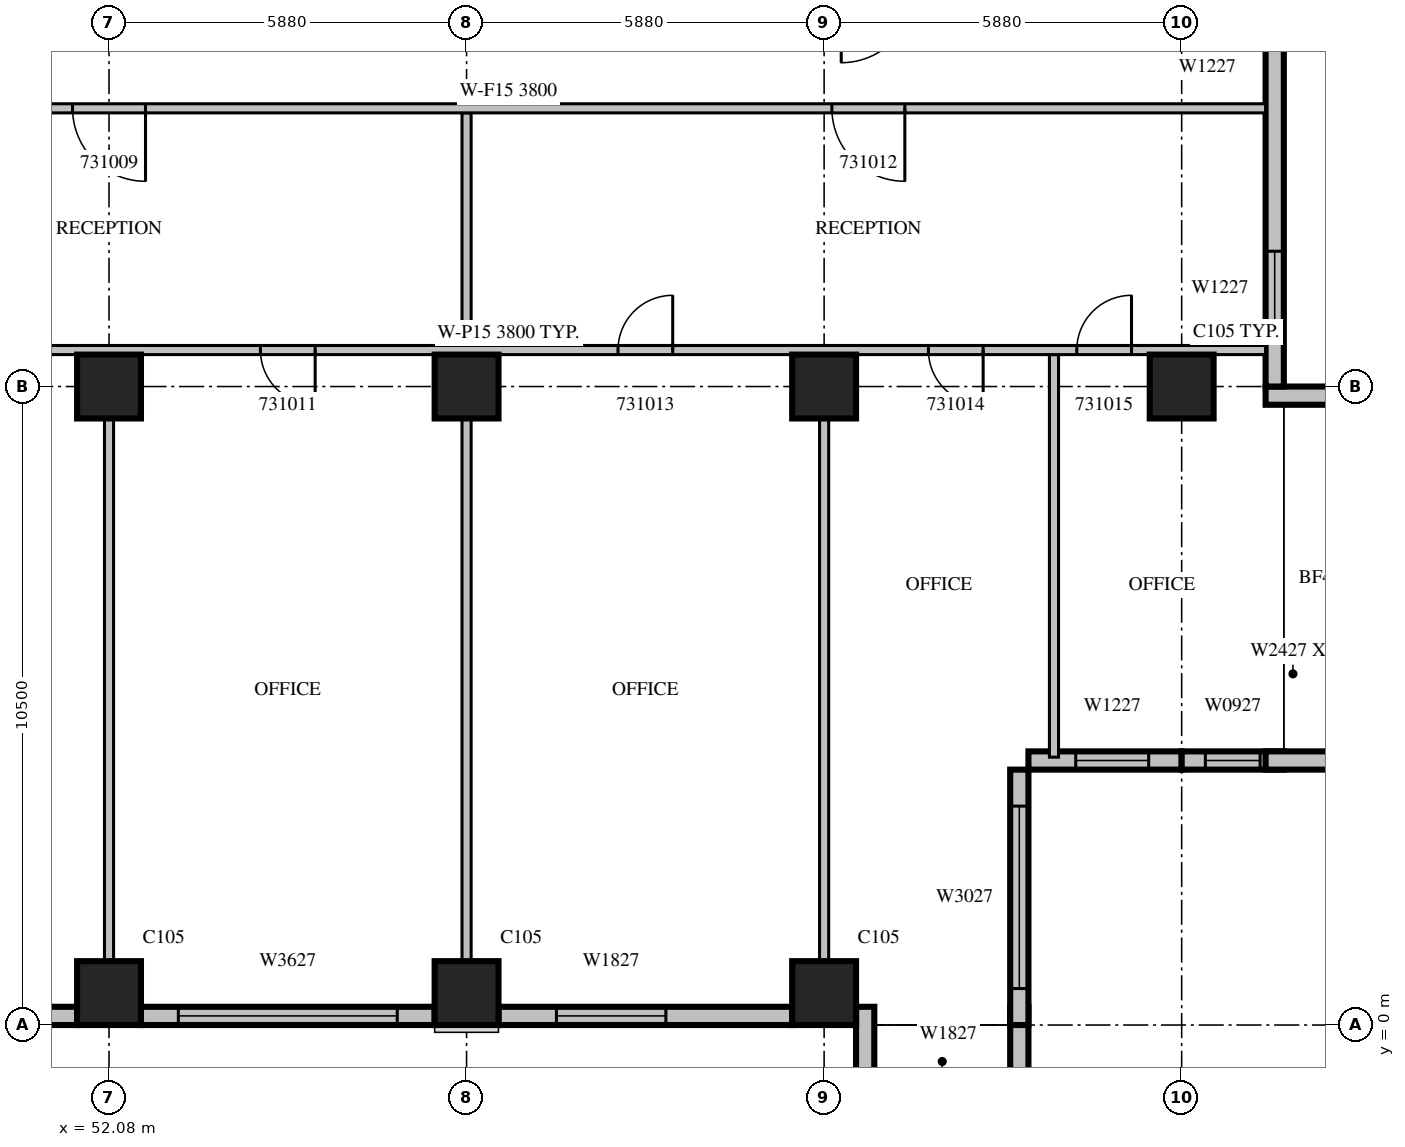
"""IFC4 building model, lengths in metres.
Left out: names, types, materials, properties, quantities, classifications, styles, units other than length and angle.
Written with IfcOpenShell. Run it as: python <this file> out.ifc"""

import sys

from ifc_helpers import new_model, si_unit, direction, frame, frame_2d, origin, origin_2d, place, context, subcontext, project, spatial, rectangle, extrude, source, transform, mapped, element, fill, save


model = new_model("IFC4")
c1 = context("Model", 3, precision=1e-05, world=origin(), true_north=direction((0.0, 1.0)))
c2 = subcontext(c1, "Body", "Model", "MODEL_VIEW")
j1 = project(units=[si_unit("LENGTHUNIT", "METRE"), si_unit("PLANEANGLEUNIT", "RADIAN")], contexts=[c1])
p1 = place(None, origin())
s1 = spatial("IfcSite", under=j1, at=p1, CompositionType="ELEMENT")
p2 = place(p1, origin())
s2 = spatial("IfcBuilding", under=s1, at=p2, CompositionType="ELEMENT")
p3 = place(p2, frame((0.0, 0.0, 141.3)))
s3 = spatial("IfcBuildingStorey", under=s2, at=p3, CompositionType="ELEMENT", Elevation=141.3)
m1 = source(origin(), c2, "Body", "SweptSolid", [
    extrude(rectangle(XDim=1.05, YDim=1.05, at=origin_2d()), origin(), (0.0, 0.0, 1.0), 4.2),
])
for number, where, z_axis, x_axis in (
    (1, (52.08, 0.525, 0.0), (0.0, 0.0, 1.0), (1.0, 0.0, 0.0)),
    (2, (57.96, 0.525, 0.0), (0.0, 0.0, 1.0), (1.0, 0.0, 0.0)),
    (3, (63.84, 0.525, 0.0), (0.0, 0.0, 1.0), (1.0, 0.0, 0.0)),
    (4, (52.08, 10.5, 0.0), (0.0, 0.0, 1.0), (1.0, 0.0, 0.0)),
    (5, (57.96, 10.5, 0.0), (0.0, 0.0, 1.0), (1.0, 0.0, 0.0)),
    (6, (63.84, 10.5, 0.0), (0.0, 0.0, 1.0), (1.0, 0.0, 0.0)),
    (7, (69.72, 10.5, 0.0), (0.0, 0.0, 1.0), (1.0, 0.0, 0.0)),
):
    element("IfcColumn", number, at=place(p3, frame(where, z_axis=z_axis, x_axis=x_axis)), inside=s3, PredefinedType="COLUMN", context=c2, shape_type="MappedRepresentation", body=[
        mapped(m1, transform((0.0, 0.0, 0.0), scale=1.0)),
    ])
m2 = source(origin(), c2, "Body", "SweptSolid", [
    extrude(rectangle(XDim=4.83, YDim=0.3, at=frame_2d((2.415, 0.0))), origin(), (0.0, 0.0, 1.0), 3.3),
])
p4 = place(p3, frame((46.725, 0.15, 0.0), z_axis=(0.0, 0.0, 1.0), x_axis=(1.0, 0.0, 0.0)))
e8 = element("IfcWall", 8, at=p4, inside=s3, PredefinedType="STANDARD", context=c2, shape_type="MappedRepresentation", body=[
    mapped(m2, transform((0.0, 0.0, 0.0), scale=1.0)),
])
m3 = source(origin(), c2, "Body", "SweptSolid", [
    extrude(rectangle(XDim=3.6, YDim=2.7, at=frame_2d((1.8, 1.35))), frame((0.0, 0.16, 0.0), z_axis=(0.0, -1.0, 0.0), x_axis=(1.0, 0.0, 0.0)), (0.0, 0.0, 1.0), 0.32),
])
p5 = place(p4, frame((0.615, 0.0, 0.6)))
e9 = element("IfcOpeningElement", 9, at=p5, cuts=e8, PredefinedType="OPENING", context=c2, shape_type="MappedRepresentation", body=[
    mapped(m3, transform((0.0, 0.0, 0.0), scale=1.0)),
])
m4 = source(origin(), c2, "Body", "SweptSolid", [
    extrude(rectangle(XDim=4.83, YDim=0.3, at=frame_2d((2.415, 0.0))), origin(), (0.0, 0.0, 1.0), 3.8),
])
p6 = place(p3, frame((52.605, 0.15, 0.0), z_axis=(0.0, 0.0, 1.0), x_axis=(1.0, 0.0, 0.0)))
e10 = element("IfcWall", 10, at=p6, inside=s3, PredefinedType="STANDARD", context=c2, shape_type="MappedRepresentation", body=[
    mapped(m4, transform((0.0, 0.0, 0.0), scale=1.0)),
])
p7 = place(p6, frame((0.615, 0.0, 0.6)))
e11 = element("IfcOpeningElement", 11, at=p7, cuts=e10, PredefinedType="OPENING", context=c2, shape_type="MappedRepresentation", body=[
    mapped(m3, transform((0.0, 0.0, 0.0), scale=1.0)),
])
p8 = place(p3, frame((58.485, 0.15, 0.0), z_axis=(0.0, 0.0, 1.0), x_axis=(1.0, 0.0, 0.0)))
e12 = element("IfcWall", 12, at=p8, inside=s3, PredefinedType="STANDARD", context=c2, shape_type="MappedRepresentation", body=[
    mapped(m4, transform((0.0, 0.0, 0.0), scale=1.0)),
])
m5 = source(origin(), c2, "Body", "SweptSolid", [
    extrude(rectangle(XDim=1.8, YDim=2.7, at=frame_2d((0.9, 1.35))), frame((0.0, 0.16, 0.0), z_axis=(0.0, -1.0, 0.0), x_axis=(1.0, 0.0, 0.0)), (0.0, 0.0, 1.0), 0.32),
])
p9 = place(p8, frame((0.953, 0.0, 0.6)))
e13 = element("IfcOpeningElement", 13, at=p9, cuts=e12, PredefinedType="OPENING", context=c2, shape_type="MappedRepresentation", body=[
    mapped(m5, transform((0.0, 0.0, 0.0), scale=1.0)),
])
m6 = source(origin(), c2, "Body", "SweptSolid", [
    extrude(rectangle(XDim=1.2, YDim=0.3, at=frame_2d((0.6, 0.0))), origin(), (0.0, 0.0, 1.0), 3.8),
])
for number, where, z_axis, x_axis in (
    (14, (64.515, 0.3, 0.0), (0.0, 0.0, 1.0), (0.0, -1.0, 0.0)),
    (15, (67.05, 0.3, 0.0), (0.0, 0.0, 1.0), (0.0, -1.0, 0.0)),
):
    element("IfcWall", number, at=place(p3, frame(where, z_axis=z_axis, x_axis=x_axis)), inside=s3, PredefinedType="STANDARD", context=c2, shape_type="MappedRepresentation", body=[
        mapped(m6, transform((0.0, 0.0, 0.0), scale=1.0)),
    ])
m7 = source(origin(), c2, "Body", "SweptSolid", [
    extrude(rectangle(XDim=4.2, YDim=0.3, at=frame_2d((2.1, 0.0))), origin(), (0.0, 0.0, 1.0), 3.8),
])
p10 = place(p3, frame((67.05, 0.0, 0.0), z_axis=(0.0, 0.0, 1.0), x_axis=(0.0, 1.0, 0.0)))
e16 = element("IfcWall", 16, at=p10, inside=s3, PredefinedType="STANDARD", context=c2, shape_type="MappedRepresentation", body=[
    mapped(m7, transform((0.0, 0.0, 0.0), scale=1.0)),
])
m8 = source(origin(), c2, "Body", "SweptSolid", [
    extrude(rectangle(XDim=3.0, YDim=2.7, at=frame_2d((1.5, 1.35))), frame((0.0, 0.16, 0.0), z_axis=(0.0, -1.0, 0.0), x_axis=(1.0, 0.0, 0.0)), (0.0, 0.0, 1.0), 0.32),
])
p11 = place(p10, frame((0.6, 0.0, 0.6)))
e17 = element("IfcOpeningElement", 17, at=p11, cuts=e16, PredefinedType="OPENING", context=c2, shape_type="MappedRepresentation", body=[
    mapped(m8, transform((0.0, 0.0, 0.0), scale=1.0)),
])
m9 = source(origin(), c2, "Body", "SweptSolid", [
    extrude(rectangle(XDim=2.52, YDim=0.3, at=frame_2d((1.26, 0.0))), origin(), (0.0, 0.0, 1.0), 3.8),
])
p12 = place(p3, frame((67.2, 4.35, 0.0), z_axis=(0.0, 0.0, 1.0), x_axis=(1.0, 0.0, 0.0)))
e18 = element("IfcWall", 18, at=p12, inside=s3, PredefinedType="STANDARD", context=c2, shape_type="MappedRepresentation", body=[
    mapped(m9, transform((0.0, 0.0, 0.0), scale=1.0)),
])
m10 = source(origin(), c2, "Body", "SweptSolid", [
    extrude(rectangle(XDim=1.2, YDim=2.7, at=frame_2d((0.6, 1.35))), frame((0.0, 0.16, 0.0), z_axis=(0.0, -1.0, 0.0), x_axis=(1.0, 0.0, 0.0)), (0.0, 0.0, 1.0), 0.32),
])
p13 = place(p12, frame((0.777, 0.0, 0.6)))
e19 = element("IfcOpeningElement", 19, at=p13, cuts=e18, PredefinedType="OPENING", context=c2, shape_type="MappedRepresentation", body=[
    mapped(m10, transform((0.0, 0.0, 0.0), scale=1.0)),
])
m11 = source(origin(), c2, "Body", "SweptSolid", [
    extrude(rectangle(XDim=1.68, YDim=0.3, at=frame_2d((0.84, 0.0))), origin(), (0.0, 0.0, 1.0), 3.8),
])
p14 = place(p3, frame((69.72, 4.35, 0.0), z_axis=(0.0, 0.0, 1.0), x_axis=(1.0, 0.0, 0.0)))
e20 = element("IfcWall", 20, at=p14, inside=s3, PredefinedType="STANDARD", context=c2, shape_type="MappedRepresentation", body=[
    mapped(m11, transform((0.0, 0.0, 0.0), scale=1.0)),
])
m12 = source(origin(), c2, "Body", "SweptSolid", [
    extrude(rectangle(XDim=0.9, YDim=2.7, at=frame_2d((0.45, 1.35))), frame((0.0, 0.16, 0.0), z_axis=(0.0, -1.0, 0.0), x_axis=(1.0, 0.0, 0.0)), (0.0, 0.0, 1.0), 0.32),
])
p15 = place(p14, frame((0.39, 0.0, 0.6)))
e21 = element("IfcOpeningElement", 21, at=p15, cuts=e20, PredefinedType="OPENING", context=c2, shape_type="MappedRepresentation", body=[
    mapped(m12, transform((0.0, 0.0, 0.0), scale=1.0)),
])
for number, where, z_axis, x_axis in (
    (22, (71.1, 4.35, 0.0), (0.0, 0.0, 1.0), (1.0, 0.0, 0.0)),
    (23, (71.1, 10.35, 0.0), (0.0, 0.0, 1.0), (1.0, 0.0, 0.0)),
):
    element("IfcWall", number, at=place(p3, frame(where, z_axis=z_axis, x_axis=x_axis)), inside=s3, PredefinedType="STANDARD", context=c2, shape_type="MappedRepresentation", body=[
        mapped(m6, transform((0.0, 0.0, 0.0), scale=1.0)),
    ])
m13 = source(origin(), c2, "Body", "SweptSolid", [
    extrude(rectangle(XDim=6.3, YDim=0.3, at=frame_2d((3.15, 0.0))), origin(), (0.0, 0.0, 1.0), 3.8),
])
p16 = place(p3, frame((71.25, 10.5, 0.0), z_axis=(0.0, 0.0, 1.0), x_axis=(0.0, 1.0, 0.0)))
e24 = element("IfcWall", 24, at=p16, inside=s3, PredefinedType="STANDARD", context=c2, shape_type="MappedRepresentation", body=[
    mapped(m13, transform((0.0, 0.0, 0.0), scale=1.0)),
])
p17 = place(p16, frame((1.025, 0.0, 0.6)))
e25 = element("IfcOpeningElement", 25, at=p17, cuts=e24, PredefinedType="OPENING", context=c2, shape_type="MappedRepresentation", body=[
    mapped(m10, transform((0.0, 0.0, 0.0), scale=1.0)),
])
m14 = source(origin(), c2, "Body", "SweptSolid", [
    extrude(rectangle(XDim=8.927, YDim=0.15, at=frame_2d((4.463, 0.0))), origin(), (0.0, 0.0, 1.0), 3.8),
])
for number, where, z_axis, x_axis in (
    (26, (52.08, 1.049, 0.0), (0.0, 0.0, 1.0), (0.0, 1.0, 0.0)),
    (27, (63.84, 1.049, 0.0), (0.0, 0.0, 1.0), (0.0, 1.0, 0.0)),
):
    element("IfcWall", number, at=place(p3, frame(where, z_axis=z_axis, x_axis=x_axis)), inside=s3, PredefinedType="PARTITIONING", context=c2, shape_type="MappedRepresentation", body=[
        mapped(m14, transform((0.0, 0.0, 0.0), scale=1.0)),
    ])
m15 = source(origin(), c2, "Body", "SweptSolid", [
    extrude(rectangle(XDim=6.62, YDim=0.15, at=frame_2d((3.31, 0.0))), origin(), (0.0, 0.0, 1.0), 3.8),
])
p18 = place(p3, frame((67.62, 4.405, 0.0), z_axis=(0.0, 0.0, 1.0), x_axis=(0.0, 1.0, 0.0)))
e28 = element("IfcWall", 28, at=p18, inside=s3, PredefinedType="PARTITIONING", context=c2, shape_type="MappedRepresentation", body=[
    mapped(m15, transform((0.0, 0.0, 0.0), scale=1.0)),
])
p19 = place(p3, frame((57.96, 1.049, 0.0), z_axis=(0.0, 0.0, 1.0), x_axis=(0.0, 1.0, 0.0)))
e29 = element("IfcWall", 29, at=p19, inside=s3, PredefinedType="PARTITIONING", context=c2, shape_type="MappedRepresentation", body=[
    mapped(m14, transform((0.0, 0.0, 0.0), scale=1.0)),
])
m16 = source(origin(), c2, "Body", "SweptSolid", [
    extrude(rectangle(XDim=3.825, YDim=0.15, at=frame_2d((1.913, 0.0))), origin(), (0.0, 0.0, 1.0), 3.8),
])
p20 = place(p3, frame((57.96, 11.175, 0.0), z_axis=(0.0, 0.0, 1.0), x_axis=(0.0, 1.0, 0.0)))
e30 = element("IfcWall", 30, at=p20, inside=s3, PredefinedType="PARTITIONING", context=c2, shape_type="MappedRepresentation", body=[
    mapped(m16, transform((0.0, 0.0, 0.0), scale=1.0)),
])
m17 = source(origin(), c2, "Body", "SweptSolid", [
    extrude(rectangle(XDim=24.9, YDim=0.15, at=frame_2d((12.45, 0.0))), origin(), (0.0, 0.0, 1.0), 3.8),
])
p21 = place(p3, frame((71.1, 11.1, 0.0), z_axis=(0.0, 0.0, 1.0), x_axis=(-1.0, 0.0, 0.0)))
e31 = element("IfcWall", 31, at=p21, inside=s3, PredefinedType="PARTITIONING", context=c2, shape_type="MappedRepresentation", body=[
    mapped(m17, transform((0.0, 0.0, 0.0), scale=1.0)),
])
m18 = source(origin(), c2, "Body", "SweptSolid", [
    extrude(rectangle(XDim=0.9, YDim=2.1, at=frame_2d((0.45, 1.05))), frame((0.0, 0.085, 0.0), z_axis=(0.0, -1.0, 0.0), x_axis=(1.0, 0.0, 0.0)), (0.0, 0.0, 1.0), 0.17),
])
p22 = place(p21, frame((21.51, 0.0, 0.0)))
e32 = element("IfcOpeningElement", 32, at=p22, cuts=e31, PredefinedType="OPENING", context=c2, shape_type="MappedRepresentation", body=[
    mapped(m18, transform((0.0, 0.0, 0.0), scale=1.0)),
])
p23 = place(p21, frame((15.63, 0.0, 0.0)))
e33 = element("IfcOpeningElement", 33, at=p23, cuts=e31, PredefinedType="OPENING", context=c2, shape_type="MappedRepresentation", body=[
    mapped(m18, transform((0.0, 0.0, 0.0), scale=1.0)),
])
p24 = place(p21, frame((9.75, 0.0, 0.0)))
e34 = element("IfcOpeningElement", 34, at=p24, cuts=e31, PredefinedType="OPENING", context=c2, shape_type="MappedRepresentation", body=[
    mapped(m18, transform((0.0, 0.0, 0.0), scale=1.0)),
])
p25 = place(p21, frame((4.645, 0.0, 0.0)))
e35 = element("IfcOpeningElement", 35, at=p25, cuts=e31, PredefinedType="OPENING", context=c2, shape_type="MappedRepresentation", body=[
    mapped(m18, transform((0.0, 0.0, 0.0), scale=1.0)),
])
p26 = place(p21, frame((2.205, 0.0, 0.0)))
e36 = element("IfcOpeningElement", 36, at=p26, cuts=e31, PredefinedType="OPENING", context=c2, shape_type="MappedRepresentation", body=[
    mapped(m18, transform((0.0, 0.0, 0.0), scale=1.0)),
])
p27 = place(p3, frame((71.1, 15.075, 0.0), z_axis=(0.0, 0.0, 1.0), x_axis=(-1.0, 0.0, 0.0)))
e37 = element("IfcWall", 37, at=p27, inside=s3, PredefinedType="PARTITIONING", context=c2, shape_type="MappedRepresentation", body=[
    mapped(m17, transform((0.0, 0.0, 0.0), scale=1.0)),
])
m19 = source(origin(), c2, "Body", "SweptSolid", [
    extrude(rectangle(XDim=1.2, YDim=2.1, at=frame_2d((0.6, 1.05))), frame((0.0, 0.085, 0.0), z_axis=(0.0, -1.0, 0.0), x_axis=(1.0, 0.0, 0.0)), (0.0, 0.0, 1.0), 0.17),
])
p28 = place(p27, frame((18.42, 0.0, 0.0)))
e38 = element("IfcOpeningElement", 38, at=p28, cuts=e37, PredefinedType="OPENING", context=c2, shape_type="MappedRepresentation", body=[
    mapped(m19, transform((0.0, 0.0, 0.0), scale=1.0)),
])
p29 = place(p27, frame((5.933, 0.0, 0.0)))
e39 = element("IfcOpeningElement", 39, at=p29, cuts=e37, PredefinedType="OPENING", context=c2, shape_type="MappedRepresentation", body=[
    mapped(m19, transform((0.0, 0.0, 0.0), scale=1.0)),
])
m20 = source(origin(), c2, "Body", "SweptSolid", [
    extrude(rectangle(XDim=3.6, YDim=2.7, at=frame_2d((1.8, 1.35))), frame((0.0, 0.03, 0.0), z_axis=(0.0, -1.0, 0.0), x_axis=(1.0, 0.0, 0.0)), (0.0, 0.0, 1.0), 0.06),
])
p30 = place(p7, origin())
e40 = element("IfcWindow", 40, at=p30, inside=s3, PartitioningType="SINGLE_PANEL", PredefinedType="WINDOW", context=c2, shape_type="MappedRepresentation", body=[
    mapped(m20, transform((0.0, 0.0, 0.0), scale=1.0)),
])
fill(e11, e40)
m21 = source(origin(), c2, "Body", "SweptSolid", [
    extrude(rectangle(XDim=1.8, YDim=2.7, at=frame_2d((0.9, 1.35))), frame((0.0, 0.03, 0.0), z_axis=(0.0, -1.0, 0.0), x_axis=(1.0, 0.0, 0.0)), (0.0, 0.0, 1.0), 0.06),
])
p31 = place(p9, origin())
e41 = element("IfcWindow", 41, at=p31, inside=s3, PartitioningType="SINGLE_PANEL", PredefinedType="WINDOW", context=c2, shape_type="MappedRepresentation", body=[
    mapped(m21, transform((0.0, 0.0, 0.0), scale=1.0)),
])
fill(e13, e41)
m22 = source(origin(), c2, "Body", "SweptSolid", [
    extrude(rectangle(XDim=3.0, YDim=2.7, at=frame_2d((1.5, 1.35))), frame((0.0, 0.03, 0.0), z_axis=(0.0, -1.0, 0.0), x_axis=(1.0, 0.0, 0.0)), (0.0, 0.0, 1.0), 0.06),
])
p32 = place(p11, origin())
e42 = element("IfcWindow", 42, at=p32, inside=s3, PartitioningType="SINGLE_PANEL", PredefinedType="WINDOW", context=c2, shape_type="MappedRepresentation", body=[
    mapped(m22, transform((0.0, 0.0, 0.0), scale=1.0)),
])
fill(e17, e42)
m23 = source(origin(), c2, "Body", "SweptSolid", [
    extrude(rectangle(XDim=1.2, YDim=2.7, at=frame_2d((0.6, 1.35))), frame((0.0, 0.03, 0.0), z_axis=(0.0, -1.0, 0.0), x_axis=(1.0, 0.0, 0.0)), (0.0, 0.0, 1.0), 0.06),
])
p33 = place(p13, origin())
e43 = element("IfcWindow", 43, at=p33, inside=s3, PartitioningType="SINGLE_PANEL", PredefinedType="WINDOW", context=c2, shape_type="MappedRepresentation", body=[
    mapped(m23, transform((0.0, 0.0, 0.0), scale=1.0)),
])
fill(e19, e43)
m24 = source(origin(), c2, "Body", "SweptSolid", [
    extrude(rectangle(XDim=0.9, YDim=2.7, at=frame_2d((0.45, 1.35))), frame((0.0, 0.03, 0.0), z_axis=(0.0, -1.0, 0.0), x_axis=(1.0, 0.0, 0.0)), (0.0, 0.0, 1.0), 0.06),
])
p34 = place(p15, origin())
e44 = element("IfcWindow", 44, at=p34, inside=s3, PartitioningType="SINGLE_PANEL", PredefinedType="WINDOW", context=c2, shape_type="MappedRepresentation", body=[
    mapped(m24, transform((0.0, 0.0, 0.0), scale=1.0)),
])
fill(e21, e44)
p35 = place(p17, origin())
e45 = element("IfcWindow", 45, at=p35, inside=s3, PartitioningType="SINGLE_PANEL", PredefinedType="WINDOW", context=c2, shape_type="MappedRepresentation", body=[
    mapped(m23, transform((0.0, 0.0, 0.0), scale=1.0)),
])
fill(e25, e45)
m25 = source(origin(), c2, "Body", "SweptSolid", [
    extrude(rectangle(XDim=1.2, YDim=2.1, at=frame_2d((0.6, 1.05))), frame((0.0, 0.025, 0.0), z_axis=(0.0, -1.0, 0.0), x_axis=(1.0, 0.0, 0.0)), (0.0, 0.0, 1.0), 0.05),
])
p36 = place(p28, origin())
e46 = element("IfcDoor", 46, at=p36, inside=s3, OperationType="SINGLE_SWING_LEFT", PredefinedType="DOOR", context=c2, shape_type="MappedRepresentation", body=[
    mapped(m25, transform((0.0, 0.0, 0.0), scale=1.0)),
])
fill(e38, e46)
m26 = source(origin(), c2, "Body", "SweptSolid", [
    extrude(rectangle(XDim=0.9, YDim=2.1, at=frame_2d((0.45, 1.05))), frame((0.0, 0.025, 0.0), z_axis=(0.0, -1.0, 0.0), x_axis=(1.0, 0.0, 0.0)), (0.0, 0.0, 1.0), 0.05),
])
p37 = place(p23, origin())
e47 = element("IfcDoor", 47, at=p37, inside=s3, OperationType="SINGLE_SWING_LEFT", PredefinedType="DOOR", context=c2, shape_type="MappedRepresentation", body=[
    mapped(m26, transform((0.0, 0.0, 0.0), scale=1.0)),
])
fill(e33, e47)
p38 = place(p29, origin())
e48 = element("IfcDoor", 48, at=p38, inside=s3, OperationType="SINGLE_SWING_LEFT", PredefinedType="DOOR", context=c2, shape_type="MappedRepresentation", body=[
    mapped(m25, transform((0.0, 0.0, 0.0), scale=1.0)),
])
fill(e39, e48)
p39 = place(p24, origin())
e49 = element("IfcDoor", 49, at=p39, inside=s3, OperationType="SINGLE_SWING_RIGHT", PredefinedType="DOOR", context=c2, shape_type="MappedRepresentation", body=[
    mapped(m26, transform((0.0, 0.0, 0.0), scale=1.0)),
])
fill(e34, e49)
p40 = place(p25, origin())
e50 = element("IfcDoor", 50, at=p40, inside=s3, OperationType="SINGLE_SWING_LEFT", PredefinedType="DOOR", context=c2, shape_type="MappedRepresentation", body=[
    mapped(m26, transform((0.0, 0.0, 0.0), scale=1.0)),
])
fill(e35, e50)
p41 = place(p26, origin())
e51 = element("IfcDoor", 51, at=p41, inside=s3, OperationType="SINGLE_SWING_RIGHT", PredefinedType="DOOR", context=c2, shape_type="MappedRepresentation", body=[
    mapped(m26, transform((0.0, 0.0, 0.0), scale=1.0)),
])
fill(e36, e51)
save(model, sys.argv[1])
